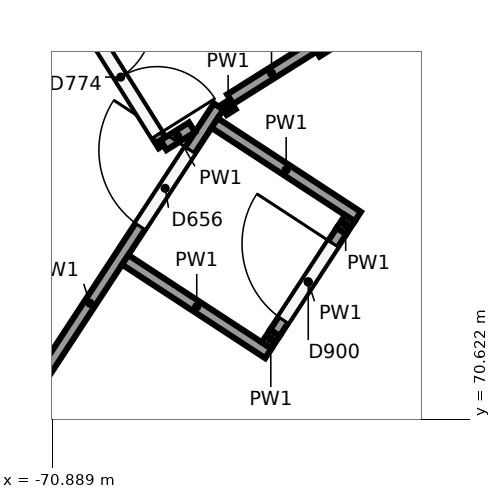
"""IFC4 building model, lengths in metres.
Left out: names, types, materials, properties, quantities, classifications, styles, units other than length and angle.
Written with IfcOpenShell. Run it as: python <this file> out.ifc"""

import sys

from ifc_helpers import new_model, si_unit, direction, frame, frame_2d, origin, place, context, subcontext, project, spatial, rectangle, extrude, element, fill, save


model = new_model("IFC4")
c1 = context("Model", 3, precision=1e-05, world=origin(), true_north=direction((0.0, 1.0)))
c2 = subcontext(c1, "Body", "Model", "MODEL_VIEW")
j1 = project(units=[si_unit("LENGTHUNIT", "METRE"), si_unit("PLANEANGLEUNIT", "RADIAN")], contexts=[c1])
p1 = place(None, origin())
s1 = spatial("IfcSite", under=j1, at=p1, CompositionType="ELEMENT")
p2 = place(p1, origin())
s2 = spatial("IfcBuilding", under=s1, at=p2, CompositionType="ELEMENT")
p3 = place(p2, frame((0.0, 0.0, 6.5)))
s3 = spatial("IfcBuildingStorey", under=s2, at=p3, CompositionType="ELEMENT", Elevation=6.5)
p4 = place(p3, frame((-72.085, 69.559, 0.0), z_axis=(0.0, 0.0, 1.0), x_axis=(0.547328054804, 0.836918156348, 0.0)))
e1 = element("IfcWall", 1, at=p4, inside=s3, PredefinedType="PARTITIONING", context=c2, shape_type="SweptSolid", body=[
    extrude(rectangle(XDim=6.186, YDim=0.15, at=frame_2d((3.093, 0.0))), origin(), (0.0, 0.0, 1.0), 5.15),
])
p5 = place(p4, frame((4.3, 0.0, 0.0)))
e2 = element("IfcOpeningElement", 2, at=p5, cuts=e1, PredefinedType="OPENING", context=c2, shape_type="SweptSolid", body=[
    extrude(rectangle(XDim=1.2, YDim=2.1, at=frame_2d((0.6, 1.05))), frame((0.0, 0.085, 0.0), z_axis=(0.0, -1.0, 0.0), x_axis=(1.0, 0.0, 0.0)), (0.0, 0.0, 1.0), 0.17),
])
p6 = place(p3, frame((-68.548, 74.832, 0.0), z_axis=(0.0, 0.0, 1.0), x_axis=(0.846736781525, 0.53201205138, 0.0)))
e3 = element("IfcWall", 3, at=p6, inside=s3, PredefinedType="PARTITIONING", context=c2, shape_type="SweptSolid", body=[
    extrude(rectangle(XDim=1.285, YDim=0.15, at=frame_2d((0.643, 0.0))), origin(), (0.0, 0.0, 1.0), 5.15),
])
p7 = place(p3, frame((-72.143, 78.552, 0.0), z_axis=(0.0, 0.0, 1.0), x_axis=(0.532063867314, -0.846704222913, 0.0)))
e4 = element("IfcWall", 4, at=p7, inside=s3, PredefinedType="PARTITIONING", context=c2, shape_type="SweptSolid", body=[
    extrude(rectangle(XDim=5.108, YDim=0.15, at=frame_2d((2.554, 0.0))), origin(), (0.0, 0.0, 1.0), 4.05),
])
p8 = place(p7, frame((3.15, 0.0, 0.0)))
e5 = element("IfcOpeningElement", 5, at=p8, cuts=e4, PredefinedType="OPENING", context=c2, shape_type="SweptSolid", body=[
    extrude(rectangle(XDim=1.8, YDim=2.1, at=frame_2d((0.9, 1.05))), frame((0.0, 0.085, 0.0), z_axis=(0.0, -1.0, 0.0), x_axis=(1.0, 0.0, 0.0)), (0.0, 0.0, 1.0), 0.17),
])
p9 = place(p7, frame((0.05, 0.0, 0.0)))
e6 = element("IfcOpeningElement", 6, at=p9, cuts=e4, PredefinedType="OPENING", context=c2, shape_type="SweptSolid", body=[
    extrude(rectangle(XDim=1.8, YDim=2.1, at=frame_2d((0.9, 1.05))), frame((0.0, 0.085, 0.0), z_axis=(0.0, -1.0, 0.0), x_axis=(1.0, 0.0, 0.0)), (0.0, 0.0, 1.0), 0.17),
])
p10 = place(p3, frame((-69.425, 74.227, 0.0), z_axis=(0.0, 0.0, 1.0), x_axis=(0.846757169089, 0.531979601674, 0.0)))
e7 = element("IfcWall", 7, at=p10, inside=s3, PredefinedType="PARTITIONING", context=c2, shape_type="SweptSolid", body=[
    extrude(rectangle(XDim=0.443, YDim=0.15, at=frame_2d((0.221, 0.0))), origin(), (0.0, 0.0, 1.0), 5.15),
])
p11 = place(p3, frame((-68.633, 74.69, 0.0), z_axis=(0.0, 0.0, 1.0), x_axis=(0.845995317019, 0.533190325852, 0.0)))
e8 = element("IfcWall", 8, at=p11, inside=s3, PredefinedType="PARTITIONING", context=c2, shape_type="SweptSolid", body=[
    extrude(rectangle(XDim=0.137, YDim=0.15, at=frame_2d((0.069, 0.0))), origin(), (0.0, 0.0, 1.0), 5.15),
])
p12 = place(p3, frame((-67.411, 75.457, 0.0), z_axis=(0.0, 0.0, 1.0), x_axis=(0.846666992422, 0.532123109762, 0.0)))
e9 = element("IfcWall", 9, at=p12, inside=s3, PredefinedType="PARTITIONING", context=c2, shape_type="SweptSolid", body=[
    extrude(rectangle(XDim=1.445, YDim=0.15, at=frame_2d((0.723, 0.0))), origin(), (0.0, 0.0, 1.0), 4.05),
])
for number, where, z_axis, x_axis in (
    (10, (-69.929, 72.719, 0.0), (0.0, 0.0, 1.0), (0.837, -0.547, 0.0)),
    (11, (-68.752, 74.519, 0.0), (0.0, 0.0, 1.0), (0.837, -0.547, 0.0)),
):
    element("IfcWall", number, at=place(p3, frame(where, z_axis=z_axis, x_axis=x_axis)), inside=s3, PredefinedType="PARTITIONING", context=c2, shape_type="SweptSolid", body=[
        extrude(rectangle(XDim=2.25, YDim=0.15, at=frame_2d((1.125, 0.0))), origin(), (0.0, 0.0, 1.0), 5.15),
    ])
p13 = place(p3, frame((-68.068, 71.592, 0.0), z_axis=(0.0, 0.0, 1.0), x_axis=(0.546788900939, 0.837270504562, 0.0)))
e12 = element("IfcWall", 12, at=p13, inside=s3, PredefinedType="PARTITIONING", context=c2, shape_type="SweptSolid", body=[
    extrude(rectangle(XDim=0.2, YDim=0.15, at=frame_2d((0.1, 0.0))), origin(), (0.0, 0.0, 1.0), 5.15),
])
p14 = place(p3, frame((-67.958, 71.759, 0.0), z_axis=(0.0, 0.0, 1.0), x_axis=(0.547319249347, 0.836923914878, 0.0)))
e13 = element("IfcWall", 13, at=p14, inside=s3, PredefinedType="PARTITIONING", context=c2, shape_type="SweptSolid", body=[
    extrude(rectangle(XDim=1.6, YDim=0.15, at=frame_2d((0.8, 0.0))), origin(), (0.0, 0.0, 1.0), 5.15),
])
p15 = place(p14, frame((0.2, 0.0, 0.0)))
e14 = element("IfcOpeningElement", 14, at=p15, cuts=e13, PredefinedType="OPENING", context=c2, shape_type="SweptSolid", body=[
    extrude(rectangle(XDim=1.2, YDim=2.1, at=frame_2d((0.6, 1.05))), frame((0.0, 0.085, 0.0), z_axis=(0.0, -1.0, 0.0), x_axis=(1.0, 0.0, 0.0)), (0.0, 0.0, 1.0), 0.17),
])
p16 = place(p3, frame((-67.083, 73.098, 0.0), z_axis=(0.0, 0.0, 1.0), x_axis=(0.548202987106, 0.836345314405, 0.0)))
e15 = element("IfcWall", 15, at=p16, inside=s3, PredefinedType="PARTITIONING", context=c2, shape_type="SweptSolid", body=[
    extrude(rectangle(XDim=0.2, YDim=0.15, at=frame_2d((0.1, 0.0))), origin(), (0.0, 0.0, 1.0), 5.15),
])
p17 = place(p5, origin())
e16 = element("IfcDoor", 16, at=p17, inside=s3, OperationType="SINGLE_SWING_RIGHT", PredefinedType="DOOR", context=c2, shape_type="SweptSolid", body=[
    extrude(rectangle(XDim=1.2, YDim=2.1, at=frame_2d((0.6, 1.05))), frame((0.0, 0.025, 0.0), z_axis=(0.0, -1.0, 0.0), x_axis=(1.0, 0.0, 0.0)), (0.0, 0.0, 1.0), 0.05),
])
fill(e2, e16)
p18 = place(p8, origin())
e17 = element("IfcDoor", 17, at=p18, inside=s3, OperationType="DOUBLE_DOOR_SINGLE_SWING", PredefinedType="DOOR", context=c2, shape_type="SweptSolid", body=[
    extrude(rectangle(XDim=1.8, YDim=2.1, at=frame_2d((0.9, 1.05))), frame((0.0, 0.025, 0.0), z_axis=(0.0, -1.0, 0.0), x_axis=(1.0, 0.0, 0.0)), (0.0, 0.0, 1.0), 0.05),
])
fill(e5, e17)
p19 = place(p15, origin())
e18 = element("IfcDoor", 18, at=p19, inside=s3, OperationType="SINGLE_SWING_RIGHT", PredefinedType="DOOR", context=c2, shape_type="SweptSolid", body=[
    extrude(rectangle(XDim=1.2, YDim=2.1, at=frame_2d((0.6, 1.05))), frame((0.0, 0.025, 0.0), z_axis=(0.0, -1.0, 0.0), x_axis=(1.0, 0.0, 0.0)), (0.0, 0.0, 1.0), 0.05),
])
fill(e14, e18)
save(model, sys.argv[1])
